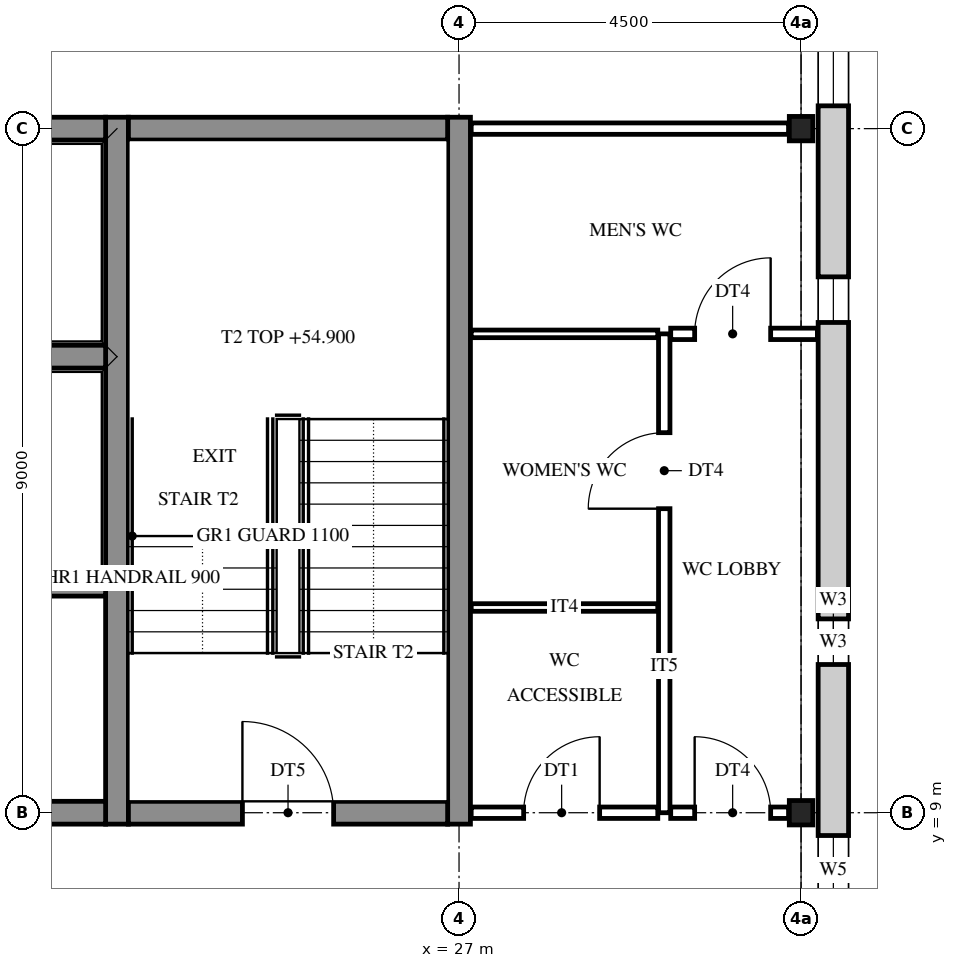
"""IFC4 building model, lengths in metres.
Left out: names, types, materials, properties, quantities, classifications, styles, units other than length and angle.
Written with IfcOpenShell. Run it as: python <this file> out.ifc"""

import sys

from ifc_helpers import new_model, si_unit, direction, frame, frame_2d, origin, origin_2d, place, context, subcontext, project, spatial, rectangle, i_section, extrude, element, fill, save


model = new_model("IFC4")
c1 = context("Model", 3, precision=1e-05, world=origin(), true_north=direction((0.0, 1.0)))
c2 = subcontext(c1, "Body", "Model", "MODEL_VIEW")
j1 = project(units=[si_unit("LENGTHUNIT", "METRE"), si_unit("PLANEANGLEUNIT", "RADIAN")], contexts=[c1])
p1 = place(None, origin())
s1 = spatial("IfcSite", under=j1, at=p1, CompositionType="ELEMENT")
p2 = place(p1, origin())
s2 = spatial("IfcBuilding", under=s1, at=p2, CompositionType="ELEMENT")
p3 = place(p2, frame((0.0, 0.0, 52.8)))
s3 = spatial("IfcBuildingStorey", under=s2, at=p3, CompositionType="ELEMENT", Elevation=52.8)
for number, where, z_axis, x_axis in (
    (1, (31.5, 9.0, 0.0), (0.0, 0.0, 1.0), (1.0, 0.0, 0.0)),
    (2, (31.5, 18.0, 0.0), (0.0, 0.0, 1.0), (1.0, 0.0, 0.0)),
):
    element("IfcColumn", number, at=place(p3, frame(where, z_axis=z_axis, x_axis=x_axis)), inside=s3, PredefinedType="COLUMN", context=c2, shape_type="SweptSolid", body=[
        extrude(i_section(OverallWidth=0.309, OverallDepth=0.321, WebThickness=0.014, FlangeThickness=0.022, FilletRadius=0.017, at=origin_2d()), origin(), (0.0, 0.0, 1.0), 4.2),
    ])
for number, where, z_axis, x_axis in (
    (3, (22.5, 8.85, 0.0), (0.0, 0.0, 1.0), (0.0, 1.0, 0.0)),
    (4, (27.0, 8.85, 0.0), (0.0, 0.0, 1.0), (0.0, 1.0, 0.0)),
):
    element("IfcWall", number, at=place(p3, frame(where, z_axis=z_axis, x_axis=x_axis)), inside=s3, PredefinedType="SHEAR", context=c2, shape_type="SweptSolid", body=[
        extrude(rectangle(XDim=9.3, YDim=0.3, at=frame_2d((4.65, 0.0))), origin(), (0.0, 0.0, 1.0), 4.2),
    ])
p4 = place(p3, frame((19.65, 9.0, 0.0), z_axis=(0.0, 0.0, 1.0), x_axis=(1.0, 0.0, 0.0)))
e5 = element("IfcWall", 5, at=p4, inside=s3, PredefinedType="SHEAR", context=c2, shape_type="SweptSolid", body=[
    extrude(rectangle(XDim=2.7, YDim=0.3, at=frame_2d((1.35, 0.0))), origin(), (0.0, 0.0, 1.0), 4.2),
])
p5 = place(p3, frame((22.65, 9.0, 0.0), z_axis=(0.0, 0.0, 1.0), x_axis=(1.0, 0.0, 0.0)))
e6 = element("IfcWall", 6, at=p5, inside=s3, PredefinedType="SHEAR", context=c2, shape_type="SweptSolid", body=[
    extrude(rectangle(XDim=4.2, YDim=0.3, at=frame_2d((2.1, 0.0))), origin(), (0.0, 0.0, 1.0), 4.2),
])
p6 = place(p5, frame((1.5, 0.0, 0.0)))
e7 = element("IfcOpeningElement", 7, at=p6, cuts=e6, PredefinedType="OPENING", context=c2, shape_type="SweptSolid", body=[
    extrude(rectangle(XDim=1.2, YDim=2.1, at=frame_2d((0.6, 1.05))), frame((0.0, 0.16, 0.0), z_axis=(0.0, -1.0, 0.0), x_axis=(1.0, 0.0, 0.0)), (0.0, 0.0, 1.0), 0.32),
])
for number, where, z_axis, x_axis in (
    (8, (19.65, 12.0, 0.0), (0.0, 0.0, 1.0), (1.0, 0.0, 0.0)),
    (9, (19.65, 15.0, 0.0), (0.0, 0.0, 1.0), (1.0, 0.0, 0.0)),
    (10, (19.65, 18.0, 0.0), (0.0, 0.0, 1.0), (1.0, 0.0, 0.0)),
):
    element("IfcWall", number, at=place(p3, frame(where, z_axis=z_axis, x_axis=x_axis)), inside=s3, PredefinedType="SHEAR", context=c2, shape_type="SweptSolid", body=[
        extrude(rectangle(XDim=2.7, YDim=0.3, at=frame_2d((1.35, 0.0))), origin(), (0.0, 0.0, 1.0), 4.2),
    ])
p7 = place(p3, frame((22.65, 18.0, 0.0), z_axis=(0.0, 0.0, 1.0), x_axis=(1.0, 0.0, 0.0)))
e11 = element("IfcWall", 11, at=p7, inside=s3, PredefinedType="SHEAR", context=c2, shape_type="SweptSolid", body=[
    extrude(rectangle(XDim=4.2, YDim=0.3, at=frame_2d((2.1, 0.0))), origin(), (0.0, 0.0, 1.0), 4.2),
])
p8 = place(p3, frame((31.925, 27.225, 0.0), z_axis=(0.0, 0.0, 1.0), x_axis=(0.0, -1.0, 0.0)))
e12 = element("IfcWall", 12, at=p8, inside=s3, PredefinedType="STANDARD", context=c2, shape_type="SweptSolid", body=[
    extrude(rectangle(XDim=27.45, YDim=0.4, at=frame_2d((13.725, 0.0))), origin(), (0.0, 0.0, 1.0), 4.2),
])
p9 = place(p8, frame((26.025, 0.0, 0.9)))
e13 = element("IfcOpeningElement", 13, at=p9, cuts=e12, PredefinedType="OPENING", context=c2, shape_type="SweptSolid", body=[
    extrude(rectangle(XDim=0.9, YDim=2.0, at=frame_2d((0.45, 1.0))), frame((0.0, 0.21, 0.0), z_axis=(0.0, -1.0, 0.0), x_axis=(1.0, 0.0, 0.0)), (0.0, 0.0, 1.0), 0.42),
])
p10 = place(p8, frame((18.525, 0.0, 0.9)))
e14 = element("IfcOpeningElement", 14, at=p10, cuts=e12, PredefinedType="OPENING", context=c2, shape_type="SweptSolid", body=[
    extrude(rectangle(XDim=0.9, YDim=2.0, at=frame_2d((0.45, 1.0))), frame((0.0, 0.21, 0.0), z_axis=(0.0, -1.0, 0.0), x_axis=(1.0, 0.0, 0.0)), (0.0, 0.0, 1.0), 0.42),
])
p11 = place(p8, frame((15.675, 0.0, 1.6)))
e15 = element("IfcOpeningElement", 15, at=p11, cuts=e12, PredefinedType="OPENING", context=c2, shape_type="SweptSolid", body=[
    extrude(rectangle(XDim=0.6, YDim=0.9, at=frame_2d((0.3, 0.45))), frame((0.0, 0.21, 0.0), z_axis=(0.0, -1.0, 0.0), x_axis=(1.0, 0.0, 0.0)), (0.0, 0.0, 1.0), 0.42),
])
p12 = place(p8, frame((11.175, 0.0, 1.6)))
e16 = element("IfcOpeningElement", 16, at=p12, cuts=e12, PredefinedType="OPENING", context=c2, shape_type="SweptSolid", body=[
    extrude(rectangle(XDim=0.6, YDim=0.9, at=frame_2d((0.3, 0.45))), frame((0.0, 0.21, 0.0), z_axis=(0.0, -1.0, 0.0), x_axis=(1.0, 0.0, 0.0)), (0.0, 0.0, 1.0), 0.42),
])
p13 = place(p8, frame((8.025, 0.0, 0.9)))
e17 = element("IfcOpeningElement", 17, at=p13, cuts=e12, PredefinedType="OPENING", context=c2, shape_type="SweptSolid", body=[
    extrude(rectangle(XDim=0.9, YDim=2.0, at=frame_2d((0.45, 1.0))), frame((0.0, 0.21, 0.0), z_axis=(0.0, -1.0, 0.0), x_axis=(1.0, 0.0, 0.0)), (0.0, 0.0, 1.0), 0.42),
])
p14 = place(p8, frame((0.525, 0.0, 0.9)))
e18 = element("IfcOpeningElement", 18, at=p14, cuts=e12, PredefinedType="OPENING", context=c2, shape_type="SweptSolid", body=[
    extrude(rectangle(XDim=0.9, YDim=2.0, at=frame_2d((0.45, 1.0))), frame((0.0, 0.21, 0.0), z_axis=(0.0, -1.0, 0.0), x_axis=(1.0, 0.0, 0.0)), (0.0, 0.0, 1.0), 0.42),
])
p15 = place(p3, frame((29.7, 9.0, 0.0), z_axis=(0.0, 0.0, 1.0), x_axis=(0.0, 1.0, 0.0)))
e19 = element("IfcWall", 19, at=p15, inside=s3, PredefinedType="PARTITIONING", context=c2, shape_type="SweptSolid", body=[
    extrude(rectangle(XDim=6.3, YDim=0.15, at=frame_2d((3.15, 0.0))), origin(), (0.0, 0.0, 1.0), 3.542),
])
p16 = place(p15, frame((4.0, 0.0, 0.0)))
e20 = element("IfcOpeningElement", 20, at=p16, cuts=e19, PredefinedType="OPENING", context=c2, shape_type="SweptSolid", body=[
    extrude(rectangle(XDim=1.0, YDim=2.1, at=frame_2d((0.5, 1.05))), frame((0.0, 0.085, 0.0), z_axis=(0.0, -1.0, 0.0), x_axis=(1.0, 0.0, 0.0)), (0.0, 0.0, 1.0), 0.17),
])
p17 = place(p3, frame((27.16, 9.0, 0.0), z_axis=(0.0, 0.0, 1.0), x_axis=(1.0, 0.0, 0.0)))
e21 = element("IfcWall", 21, at=p17, inside=s3, PredefinedType="PARTITIONING", context=c2, shape_type="SweptSolid", body=[
    extrude(rectangle(XDim=2.455, YDim=0.15, at=frame_2d((1.228, 0.0))), origin(), (0.0, 0.0, 1.0), 3.542),
])
p18 = place(p17, frame((0.69, 0.0, 0.0)))
e22 = element("IfcOpeningElement", 22, at=p18, cuts=e21, PredefinedType="OPENING", context=c2, shape_type="SweptSolid", body=[
    extrude(rectangle(XDim=1.0, YDim=2.1, at=frame_2d((0.5, 1.05))), frame((0.0, 0.085, 0.0), z_axis=(0.0, -1.0, 0.0), x_axis=(1.0, 0.0, 0.0)), (0.0, 0.0, 1.0), 0.17),
])
p19 = place(p3, frame((29.785, 9.0, 0.0), z_axis=(0.0, 0.0, 1.0), x_axis=(1.0, 0.0, 0.0)))
e23 = element("IfcWall", 23, at=p19, inside=s3, PredefinedType="PARTITIONING", context=c2, shape_type="SweptSolid", body=[
    extrude(rectangle(XDim=1.551, YDim=0.15, at=frame_2d((0.775, 0.0))), origin(), (0.0, 0.0, 1.0), 3.542),
])
p20 = place(p19, frame((0.315, 0.0, 0.0)))
e24 = element("IfcOpeningElement", 24, at=p20, cuts=e23, PredefinedType="OPENING", context=c2, shape_type="SweptSolid", body=[
    extrude(rectangle(XDim=1.0, YDim=2.1, at=frame_2d((0.5, 1.05))), frame((0.0, 0.085, 0.0), z_axis=(0.0, -1.0, 0.0), x_axis=(1.0, 0.0, 0.0)), (0.0, 0.0, 1.0), 0.17),
])
for number, where, z_axis, x_axis in (
    (25, (27.16, 11.7, 0.0), (0.0, 0.0, 1.0), (1.0, 0.0, 0.0)),
    (26, (27.16, 15.3, 0.0), (0.0, 0.0, 1.0), (1.0, 0.0, 0.0)),
):
    element("IfcWall", number, at=place(p3, frame(where, z_axis=z_axis, x_axis=x_axis)), inside=s3, PredefinedType="PARTITIONING", context=c2, shape_type="SweptSolid", body=[
        extrude(rectangle(XDim=2.455, YDim=0.1, at=frame_2d((1.228, 0.0))), origin(), (0.0, 0.0, 1.0), 3.542),
    ])
p21 = place(p3, frame((29.785, 15.3, 0.0), z_axis=(0.0, 0.0, 1.0), x_axis=(1.0, 0.0, 0.0)))
e27 = element("IfcWall", 27, at=p21, inside=s3, PredefinedType="PARTITIONING", context=c2, shape_type="SweptSolid", body=[
    extrude(rectangle(XDim=1.93, YDim=0.15, at=frame_2d((0.965, 0.0))), origin(), (0.0, 0.0, 1.0), 3.542),
])
p22 = place(p21, frame((0.315, 0.0, 0.0)))
e28 = element("IfcOpeningElement", 28, at=p22, cuts=e27, PredefinedType="OPENING", context=c2, shape_type="SweptSolid", body=[
    extrude(rectangle(XDim=1.0, YDim=2.1, at=frame_2d((0.5, 1.05))), frame((0.0, 0.085, 0.0), z_axis=(0.0, -1.0, 0.0), x_axis=(1.0, 0.0, 0.0)), (0.0, 0.0, 1.0), 0.17),
])
p23 = place(p3, frame((27.16, 18.0, 0.0), z_axis=(0.0, 0.0, 1.0), x_axis=(1.0, 0.0, 0.0)))
e29 = element("IfcWall", 29, at=p23, inside=s3, PredefinedType="PARTITIONING", context=c2, shape_type="SweptSolid", body=[
    extrude(rectangle(XDim=4.176, YDim=0.15, at=frame_2d((2.088, 0.0))), origin(), (0.0, 0.0, 1.0), 3.542),
])
p24 = place(p10, origin())
e30 = element("IfcWindow", 30, at=p24, inside=s3, PartitioningType="SINGLE_PANEL", PredefinedType="WINDOW", context=c2, shape_type="SweptSolid", body=[
    extrude(rectangle(XDim=0.9, YDim=2.0, at=frame_2d((0.45, 1.0))), frame((0.0, 0.03, 0.0), z_axis=(0.0, -1.0, 0.0), x_axis=(1.0, 0.0, 0.0)), (0.0, 0.0, 1.0), 0.06),
])
fill(e14, e30)
p25 = place(p11, origin())
e31 = element("IfcWindow", 31, at=p25, inside=s3, PartitioningType="SINGLE_PANEL", PredefinedType="WINDOW", context=c2, shape_type="SweptSolid", body=[
    extrude(rectangle(XDim=0.6, YDim=0.9, at=frame_2d((0.3, 0.45))), frame((0.0, 0.03, 0.0), z_axis=(0.0, -1.0, 0.0), x_axis=(1.0, 0.0, 0.0)), (0.0, 0.0, 1.0), 0.06),
])
fill(e15, e31)
p26 = place(p12, origin())
e32 = element("IfcWindow", 32, at=p26, inside=s3, PartitioningType="SINGLE_PANEL", PredefinedType="WINDOW", context=c2, shape_type="SweptSolid", body=[
    extrude(rectangle(XDim=0.6, YDim=0.9, at=frame_2d((0.3, 0.45))), frame((0.0, 0.03, 0.0), z_axis=(0.0, -1.0, 0.0), x_axis=(1.0, 0.0, 0.0)), (0.0, 0.0, 1.0), 0.06),
])
fill(e16, e32)
p27 = place(p13, origin())
e33 = element("IfcWindow", 33, at=p27, inside=s3, PartitioningType="SINGLE_PANEL", PredefinedType="WINDOW", context=c2, shape_type="SweptSolid", body=[
    extrude(rectangle(XDim=0.9, YDim=2.0, at=frame_2d((0.45, 1.0))), frame((0.0, 0.03, 0.0), z_axis=(0.0, -1.0, 0.0), x_axis=(1.0, 0.0, 0.0)), (0.0, 0.0, 1.0), 0.06),
])
fill(e17, e33)
p28 = place(p6, origin())
e34 = element("IfcDoor", 34, at=p28, inside=s3, OperationType="SINGLE_SWING_LEFT", PredefinedType="DOOR", context=c2, shape_type="SweptSolid", body=[
    extrude(rectangle(XDim=1.2, YDim=2.1, at=frame_2d((0.6, 1.05))), frame((0.0, 0.025, 0.0), z_axis=(0.0, -1.0, 0.0), x_axis=(1.0, 0.0, 0.0)), (0.0, 0.0, 1.0), 0.05),
])
fill(e7, e34)
p29 = place(p18, origin())
e35 = element("IfcDoor", 35, at=p29, inside=s3, OperationType="SINGLE_SWING_RIGHT", PredefinedType="DOOR", context=c2, shape_type="SweptSolid", body=[
    extrude(rectangle(XDim=1.0, YDim=2.1, at=frame_2d((0.5, 1.05))), frame((0.0, 0.025, 0.0), z_axis=(0.0, -1.0, 0.0), x_axis=(1.0, 0.0, 0.0)), (0.0, 0.0, 1.0), 0.05),
])
fill(e22, e35)
p30 = place(p16, origin())
e36 = element("IfcDoor", 36, at=p30, inside=s3, OperationType="SINGLE_SWING_LEFT", PredefinedType="DOOR", context=c2, shape_type="SweptSolid", body=[
    extrude(rectangle(XDim=1.0, YDim=2.1, at=frame_2d((0.5, 1.05))), frame((0.0, 0.025, 0.0), z_axis=(0.0, -1.0, 0.0), x_axis=(1.0, 0.0, 0.0)), (0.0, 0.0, 1.0), 0.05),
])
fill(e20, e36)
p31 = place(p22, origin())
e37 = element("IfcDoor", 37, at=p31, inside=s3, OperationType="SINGLE_SWING_RIGHT", PredefinedType="DOOR", context=c2, shape_type="SweptSolid", body=[
    extrude(rectangle(XDim=1.0, YDim=2.1, at=frame_2d((0.5, 1.05))), frame((0.0, 0.025, 0.0), z_axis=(0.0, -1.0, 0.0), x_axis=(1.0, 0.0, 0.0)), (0.0, 0.0, 1.0), 0.05),
])
fill(e28, e37)
p32 = place(p20, origin())
e38 = element("IfcDoor", 38, at=p32, inside=s3, OperationType="SINGLE_SWING_LEFT", PredefinedType="DOOR", context=c2, shape_type="SweptSolid", body=[
    extrude(rectangle(XDim=1.0, YDim=2.1, at=frame_2d((0.5, 1.05))), frame((0.0, 0.025, 0.0), z_axis=(0.0, -1.0, 0.0), x_axis=(1.0, 0.0, 0.0)), (0.0, 0.0, 1.0), 0.05),
])
fill(e24, e38)
save(model, sys.argv[1])
